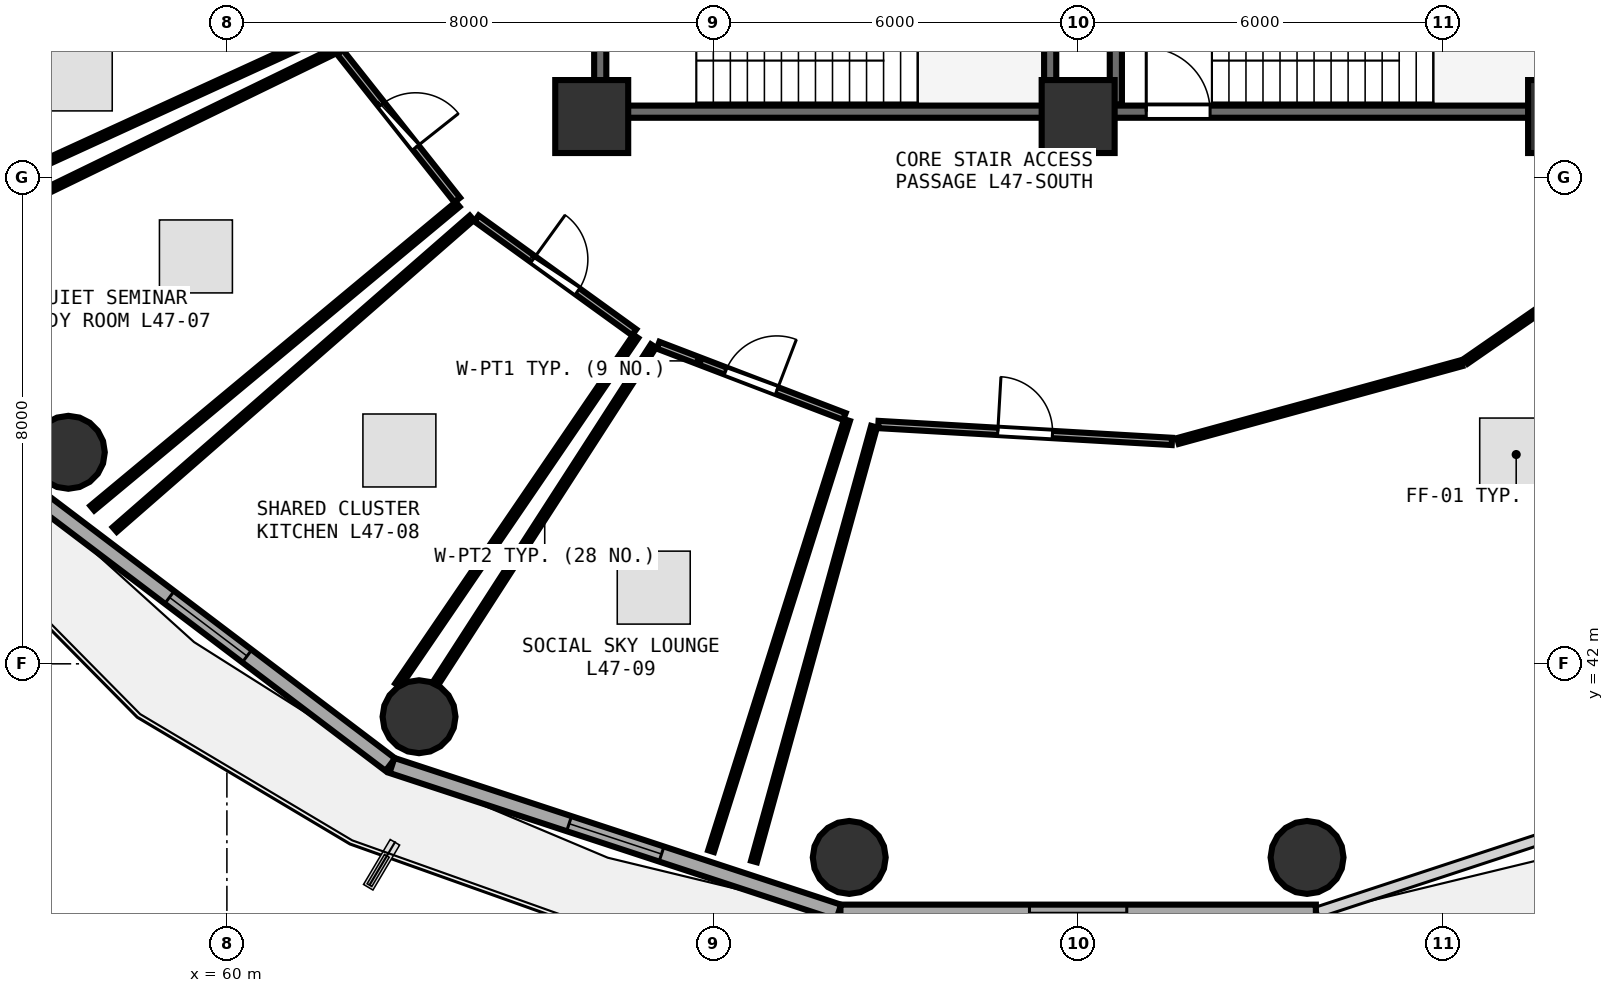
"""IFC4 building model, lengths in metres.
Left out: names, types, materials, properties, quantities, classifications, styles, units other than length and angle.
Written with IfcOpenShell. Run it as: python <this file> out.ifc"""

import sys

from ifc_helpers import new_model, si_unit, direction, frame, frame_2d, origin, origin_2d, place, context, subcontext, project, spatial, rectangle, circle, extrude, element, fill, save


model = new_model("IFC4")
c1 = context("Model", 3, precision=1e-05, world=origin(), true_north=direction((0.0, 1.0)))
c2 = subcontext(c1, "Body", "Model", "MODEL_VIEW")
j1 = project(units=[si_unit("LENGTHUNIT", "METRE"), si_unit("PLANEANGLEUNIT", "RADIAN")], contexts=[c1])
p1 = place(None, origin())
s1 = spatial("IfcSite", under=j1, at=p1, CompositionType="ELEMENT")
p2 = place(p1, origin())
s2 = spatial("IfcBuilding", under=s1, at=p2, CompositionType="ELEMENT")
p3 = place(p2, frame((0.0, 0.0, 184.35)))
s3 = spatial("IfcBuildingStorey", under=s2, at=p3, CompositionType="ELEMENT", Elevation=184.35)
for number, where, z_axis, x_axis in (
    (1, (66.0, 51.0, 0.0), (0.0, 0.0, 1.0), (1.0, 0.0, 0.0)),
    (2, (74.0, 51.0, 0.0), (0.0, 0.0, 1.0), (1.0, 0.0, 0.0)),
    (3, (82.0, 51.0, 0.0), (0.0, 0.0, 1.0), (1.0, 0.0, 0.0)),
):
    element("IfcColumn", number, at=place(p3, frame(where, z_axis=z_axis, x_axis=x_axis)), inside=s3, PredefinedType="PILASTER", context=c2, shape_type="SweptSolid", body=[
        extrude(rectangle(XDim=1.2, YDim=1.2, at=origin_2d()), origin(), (0.0, 0.0, 1.0), 4.76),
    ])
for number, where, z_axis, x_axis in (
    (4, (57.392, 45.479, 0.0), (0.0, 0.0, 1.0), (1.0, 0.0, 0.0)),
    (5, (63.16, 41.13, 0.0), (0.0, 0.0, 1.0), (1.0, 0.0, 0.0)),
    (6, (70.235, 38.816, 0.0), (0.0, 0.0, 1.0), (1.0, 0.0, 0.0)),
    (7, (77.765, 38.816, 0.0), (0.0, 0.0, 1.0), (1.0, 0.0, 0.0)),
):
    element("IfcColumn", number, at=place(p3, frame(where, z_axis=z_axis, x_axis=x_axis)), inside=s3, PredefinedType="COLUMN", context=c2, shape_type="SweptSolid", body=[
        extrude(circle(Radius=0.6, at=origin_2d()), origin(), (0.0, 0.0, 1.0), 4.76),
    ])
p4 = place(p3, frame((56.699, 44.878, 0.0), z_axis=(0.0, 0.0, 1.0), x_axis=(0.797163719609, -0.603763202042, 0.0)))
e8 = element("IfcWall", 8, at=p4, inside=s3, PredefinedType="SOLIDWALL", context=c2, shape_type="SweptSolid", body=[
    extrude(rectangle(XDim=7.512, YDim=0.26, at=frame_2d((3.756, 0.0))), origin(), (0.0, 0.0, 1.0), 4.345),
])
p5 = place(p4, frame((2.956, 0.0, 0.85)))
e9 = element("IfcOpeningElement", 9, at=p5, cuts=e8, PredefinedType="OPENING", context=c2, shape_type="SweptSolid", body=[
    extrude(rectangle(XDim=1.6, YDim=1.45, at=frame_2d((0.8, 0.725))), frame((0.0, 0.14, 0.0), z_axis=(0.0, -1.0, 0.0), x_axis=(1.0, 0.0, 0.0)), (0.0, 0.0, 1.0), 0.28),
])
p6 = place(p3, frame((62.714, 40.328, 0.0), z_axis=(0.0, 0.0, 1.0), x_axis=(0.950038302428, -0.312133343173, 0.0)))
e10 = element("IfcWall", 10, at=p6, inside=s3, PredefinedType="SOLIDWALL", context=c2, shape_type="SweptSolid", body=[
    extrude(rectangle(XDim=7.733, YDim=0.26, at=frame_2d((3.867, 0.0))), origin(), (0.0, 0.0, 1.0), 4.345),
])
p7 = place(p6, frame((3.067, 0.0, 0.85)))
e11 = element("IfcOpeningElement", 11, at=p7, cuts=e10, PredefinedType="OPENING", context=c2, shape_type="SweptSolid", body=[
    extrude(rectangle(XDim=1.6, YDim=1.45, at=frame_2d((0.8, 0.725))), frame((0.0, 0.14, 0.0), z_axis=(0.0, -1.0, 0.0), x_axis=(1.0, 0.0, 0.0)), (0.0, 0.0, 1.0), 0.28),
])
p8 = place(p3, frame((70.091, 37.91, 0.0), z_axis=(0.0, 0.0, 1.0), x_axis=(1.0, 0.0, 0.0)))
e12 = element("IfcWall", 12, at=p8, inside=s3, PredefinedType="SOLIDWALL", context=c2, shape_type="SweptSolid", body=[
    extrude(rectangle(XDim=7.819, YDim=0.26, at=frame_2d((3.909, 0.0))), origin(), (0.0, 0.0, 1.0), 4.345),
])
p9 = place(p8, frame((3.109, 0.0, 0.85)))
e13 = element("IfcOpeningElement", 13, at=p9, cuts=e12, PredefinedType="OPENING", context=c2, shape_type="SweptSolid", body=[
    extrude(rectangle(XDim=1.6, YDim=1.45, at=frame_2d((0.8, 0.725))), frame((0.0, 0.14, 0.0), z_axis=(0.0, -1.0, 0.0), x_axis=(1.0, 0.0, 0.0)), (0.0, 0.0, 1.0), 0.28),
])
p10 = place(p3, frame((74.0, 51.08, 0.0), z_axis=(0.0, 0.0, 1.0), x_axis=(1.0, 0.0, 0.0)))
e14 = element("IfcWall", 14, at=p10, inside=s3, PredefinedType="SHEAR", context=c2, shape_type="SweptSolid", body=[
    extrude(rectangle(XDim=7.9, YDim=0.2, at=frame_2d((3.95, 0.0))), origin(), (0.0, 0.0, 1.0), 4.36),
])
p11 = place(p10, frame((1.12, 0.0, 0.0)))
e15 = element("IfcOpeningElement", 15, at=p11, cuts=e14, PredefinedType="OPENING", context=c2, shape_type="SweptSolid", body=[
    extrude(rectangle(XDim=1.05, YDim=2.1, at=frame_2d((0.525, 1.05))), frame((0.0, 0.11, 0.0), z_axis=(0.0, -1.0, 0.0), x_axis=(1.0, 0.0, 0.0)), (0.0, 0.0, 1.0), 0.22),
])
p12 = place(p3, frame((74.62, 54.27, 0.0), z_axis=(0.0, 0.0, 1.0), x_axis=(0.0, -1.0, 0.0)))
e16 = element("IfcWall", 16, at=p12, inside=s3, PredefinedType="SHEAR", context=c2, shape_type="SweptSolid", body=[
    extrude(rectangle(XDim=3.07, YDim=0.2, at=frame_2d((1.535, 0.0))), origin(), (0.0, 0.0, 1.0), 4.36),
])
p13 = place(p3, frame((66.26, 51.08, 0.0), z_axis=(0.0, 0.0, 1.0), x_axis=(1.0, 0.0, 0.0)))
e17 = element("IfcWall", 17, at=p13, inside=s3, PredefinedType="SHEAR", context=c2, shape_type="SweptSolid", body=[
    extrude(rectangle(XDim=7.16, YDim=0.2, at=frame_2d((3.58, 0.0))), origin(), (0.0, 0.0, 1.0), 4.36),
])
p14 = place(p3, frame((73.54, 51.2, 0.0), z_axis=(0.0, 0.0, 1.0), x_axis=(0.0, 1.0, 0.0)))
e18 = element("IfcWall", 18, at=p14, inside=s3, PredefinedType="SHEAR", context=c2, shape_type="SweptSolid", body=[
    extrude(rectangle(XDim=3.07, YDim=0.2, at=frame_2d((1.535, 0.0))), origin(), (0.0, 0.0, 1.0), 4.36),
])
p15 = place(p3, frame((66.14, 54.27, 0.0), z_axis=(0.0, 0.0, 1.0), x_axis=(0.0, -1.0, 0.0)))
e19 = element("IfcWall", 19, at=p15, inside=s3, PredefinedType="SHEAR", context=c2, shape_type="SweptSolid", body=[
    extrude(rectangle(XDim=3.07, YDim=0.2, at=frame_2d((1.535, 0.0))), origin(), (0.0, 0.0, 1.0), 4.36),
])
p16 = place(p15, frame((1.01, 0.0, 0.0)))
e20 = element("IfcOpeningElement", 20, at=p16, cuts=e19, PredefinedType="OPENING", context=c2, shape_type="SweptSolid", body=[
    extrude(rectangle(XDim=1.05, YDim=2.1, at=frame_2d((0.525, 1.05))), frame((0.0, 0.11, 0.0), z_axis=(0.0, -1.0, 0.0), x_axis=(1.0, 0.0, 0.0)), (0.0, 0.0, 1.0), 0.22),
])
p17 = place(p3, frame((70.714, 45.936, 0.0), z_axis=(0.0, 0.0, 1.0), x_axis=(0.998345519296, -0.057499774802, 0.0)))
e21 = element("IfcWall", 21, at=p17, inside=s3, PredefinedType="PARTITIONING", context=c2, shape_type="SweptSolid", body=[
    extrude(rectangle(XDim=4.836, YDim=0.12, at=frame_2d((2.418, 0.0))), origin(), (0.0, 0.0, 1.0), 2.345),
])
p18 = place(p17, frame((1.968, 0.0, 0.0)))
e22 = element("IfcOpeningElement", 22, at=p18, cuts=e21, PredefinedType="OPENING", context=c2, shape_type="SweptSolid", body=[
    extrude(rectangle(XDim=0.9, YDim=2.08, at=frame_2d((0.45, 1.04))), frame((0.0, 0.07, 0.0), z_axis=(0.0, -1.0, 0.0), x_axis=(1.0, 0.0, 0.0)), (0.0, 0.0, 1.0), 0.14),
])
p19 = place(p3, frame((61.86, 52.06, 0.0), z_axis=(0.0, 0.0, 1.0), x_axis=(0.621061577605, -0.783761773005, 0.0)))
e23 = element("IfcWall", 23, at=p19, inside=s3, PredefinedType="PARTITIONING", context=c2, shape_type="SweptSolid", body=[
    extrude(rectangle(XDim=3.103, YDim=0.12, at=frame_2d((1.552, 0.0))), origin(), (0.0, 0.0, 1.0), 2.345),
])
p20 = place(p19, frame((1.102, 0.0, 0.0)))
e24 = element("IfcOpeningElement", 24, at=p20, cuts=e23, PredefinedType="OPENING", context=c2, shape_type="SweptSolid", body=[
    extrude(rectangle(XDim=0.9, YDim=2.08, at=frame_2d((0.45, 1.04))), frame((0.0, 0.07, 0.0), z_axis=(0.0, -1.0, 0.0), x_axis=(1.0, 0.0, 0.0)), (0.0, 0.0, 1.0), 0.14),
])
p21 = place(p3, frame((64.106, 49.325, 0.0), z_axis=(0.0, 0.0, 1.0), x_axis=(0.810538273734, -0.585685672364, 0.0)))
e25 = element("IfcWall", 25, at=p21, inside=s3, PredefinedType="PARTITIONING", context=c2, shape_type="SweptSolid", body=[
    extrude(rectangle(XDim=3.198, YDim=0.12, at=frame_2d((1.599, 0.0))), origin(), (0.0, 0.0, 1.0), 2.345),
])
p22 = place(p21, frame((1.149, 0.0, 0.0)))
e26 = element("IfcOpeningElement", 26, at=p22, cuts=e25, PredefinedType="OPENING", context=c2, shape_type="SweptSolid", body=[
    extrude(rectangle(XDim=0.9, YDim=2.08, at=frame_2d((0.45, 1.04))), frame((0.0, 0.07, 0.0), z_axis=(0.0, -1.0, 0.0), x_axis=(1.0, 0.0, 0.0)), (0.0, 0.0, 1.0), 0.14),
])
p23 = place(p3, frame((67.092, 47.24, 0.0), z_axis=(0.0, 0.0, 1.0), x_axis=(0.93395246748, -0.35739724186, 0.0)))
e27 = element("IfcWall", 27, at=p23, inside=s3, PredefinedType="PARTITIONING", context=c2, shape_type="SweptSolid", body=[
    extrude(rectangle(XDim=3.28, YDim=0.12, at=frame_2d((1.64, 0.0))), origin(), (0.0, 0.0, 1.0), 4.105),
])
p24 = place(p23, frame((1.19, 0.0, 0.0)))
e28 = element("IfcOpeningElement", 28, at=p24, cuts=e27, PredefinedType="OPENING", context=c2, shape_type="SweptSolid", body=[
    extrude(rectangle(XDim=0.9, YDim=2.08, at=frame_2d((0.45, 1.04))), frame((0.0, 0.07, 0.0), z_axis=(0.0, -1.0, 0.0), x_axis=(1.0, 0.0, 0.0)), (0.0, 0.0, 1.0), 0.14),
])
p25 = place(p3, frame((75.641, 45.665, 0.0), z_axis=(0.0, 0.0, 1.0), x_axis=(0.964402925862, 0.264437131637, 0.0)))
e29 = element("IfcWall", 29, at=p25, inside=s3, PredefinedType="PARTITIONING", context=c2, shape_type="SweptSolid", body=[
    extrude(rectangle(XDim=4.836, YDim=0.1, at=frame_2d((2.418, 0.0))), origin(), (0.0, 0.0, 1.0), 2.345),
])
p26 = place(p3, frame((80.376, 46.977, 0.0), z_axis=(0.0, 0.0, 1.0), x_axis=(0.821969471946, 0.569531550653, 0.0)))
e30 = element("IfcWall", 30, at=p26, inside=s3, PredefinedType="PARTITIONING", context=c2, shape_type="SweptSolid", body=[
    extrude(rectangle(XDim=4.697, YDim=0.1, at=frame_2d((2.349, 0.0))), origin(), (0.0, 0.0, 1.0), 2.345),
])
p27 = place(p3, frame((68.669, 38.75, 0.0), z_axis=(0.0, 0.0, 1.0), x_axis=(0.26617364863, 0.963925095002, 0.0)))
e31 = element("IfcWall", 31, at=p27, inside=s3, PredefinedType="PARTITIONING", context=c2, shape_type="SweptSolid", body=[
    extrude(rectangle(XDim=7.418, YDim=0.1, at=frame_2d((3.709, 0.0))), origin(), (0.0, 0.0, 1.0), 3.895),
])
p28 = place(p3, frame((61.63, 52.359, 0.0), z_axis=(0.0, 0.0, 1.0), x_axis=(-0.909155211227, -0.416457443083, 0.0)))
e32 = element("IfcWall", 32, at=p28, inside=s3, PredefinedType="PARTITIONING", context=c2, shape_type="SweptSolid", body=[
    extrude(rectangle(XDim=8.012, YDim=0.1, at=frame_2d((4.006, 0.0))), origin(), (0.0, 0.0, 1.0), 2.345),
])
p29 = place(p3, frame((54.083, 51.765, 0.0), z_axis=(0.0, 0.0, 1.0), x_axis=(0.954047805858, 0.299654441212, 0.0)))
e33 = element("IfcWall", 33, at=p29, inside=s3, PredefinedType="PARTITIONING", context=c2, shape_type="SweptSolid", body=[
    extrude(rectangle(XDim=3.798, YDim=0.1, at=frame_2d((1.899, 0.0))), origin(), (0.0, 0.0, 1.0), 2.345),
])
p30 = place(p3, frame((63.794, 49.555, 0.0), z_axis=(0.0, 0.0, 1.0), x_axis=(-0.768927769446, -0.639335659396, 0.0)))
e34 = element("IfcWall", 34, at=p30, inside=s3, PredefinedType="PARTITIONING", context=c2, shape_type="SweptSolid", body=[
    extrude(rectangle(XDim=7.812, YDim=0.1, at=frame_2d((3.906, 0.0))), origin(), (0.0, 0.0, 1.0), 2.345),
])
p31 = place(p3, frame((54.595, 48.593, 0.0), z_axis=(0.0, 0.0, 1.0), x_axis=(0.899324003441, 0.437282902518, 0.0)))
e35 = element("IfcWall", 35, at=p31, inside=s3, PredefinedType="PARTITIONING", context=c2, shape_type="SweptSolid", body=[
    extrude(rectangle(XDim=7.997, YDim=0.1, at=frame_2d((3.999, 0.0))), origin(), (0.0, 0.0, 1.0), 2.345),
])
p32 = place(p3, frame((66.723, 47.384, 0.0), z_axis=(0.0, 0.0, 1.0), x_axis=(-0.563521193737, -0.826101606468, 0.0)))
e36 = element("IfcWall", 36, at=p32, inside=s3, PredefinedType="PARTITIONING", context=c2, shape_type="SweptSolid", body=[
    extrude(rectangle(XDim=6.944, YDim=0.1, at=frame_2d((3.472, 0.0))), origin(), (0.0, 0.0, 1.0), 2.345),
])
p33 = place(p3, frame((58.156, 44.208, 0.0), z_axis=(0.0, 0.0, 1.0), x_axis=(0.753307828271, 0.657668089438, 0.0)))
e37 = element("IfcWall", 37, at=p33, inside=s3, PredefinedType="PARTITIONING", context=c2, shape_type="SweptSolid", body=[
    extrude(rectangle(XDim=7.793, YDim=0.1, at=frame_2d((3.897, 0.0))), origin(), (0.0, 0.0, 1.0), 2.345),
])
p34 = place(p3, frame((70.199, 46.008, 0.0), z_axis=(0.0, 0.0, 1.0), x_axis=(-0.300834252316, -0.953676440222, 0.0)))
e38 = element("IfcWall", 38, at=p34, inside=s3, PredefinedType="PARTITIONING", context=c2, shape_type="SweptSolid", body=[
    extrude(rectangle(XDim=7.433, YDim=0.1, at=frame_2d((3.716, 0.0))), origin(), (0.0, 0.0, 1.0), 3.895),
])
p35 = place(p3, frame((63.44, 41.689, 0.0), z_axis=(0.0, 0.0, 1.0), x_axis=(0.542254246964, 0.840214455749, 0.0)))
e39 = element("IfcWall", 39, at=p35, inside=s3, PredefinedType="PARTITIONING", context=c2, shape_type="SweptSolid", body=[
    extrude(rectangle(XDim=6.592, YDim=0.1, at=frame_2d((3.296, 0.0))), origin(), (0.0, 0.0, 1.0), 2.345),
])
p36 = place(p5, origin())
e40 = element("IfcWindow", 40, at=p36, inside=s3, PartitioningType="SINGLE_PANEL", PredefinedType="WINDOW", context=c2, shape_type="SweptSolid", body=[
    extrude(rectangle(XDim=1.6, YDim=1.45, at=frame_2d((0.8, 0.725))), frame((0.0, 0.03, 0.0), z_axis=(0.0, -1.0, 0.0), x_axis=(1.0, 0.0, 0.0)), (0.0, 0.0, 1.0), 0.06),
])
fill(e9, e40)
p37 = place(p7, origin())
e41 = element("IfcWindow", 41, at=p37, inside=s3, PartitioningType="SINGLE_PANEL", PredefinedType="WINDOW", context=c2, shape_type="SweptSolid", body=[
    extrude(rectangle(XDim=1.6, YDim=1.45, at=frame_2d((0.8, 0.725))), frame((0.0, 0.03, 0.0), z_axis=(0.0, -1.0, 0.0), x_axis=(1.0, 0.0, 0.0)), (0.0, 0.0, 1.0), 0.06),
])
fill(e11, e41)
p38 = place(p9, origin())
e42 = element("IfcWindow", 42, at=p38, inside=s3, PartitioningType="SINGLE_PANEL", PredefinedType="WINDOW", context=c2, shape_type="SweptSolid", body=[
    extrude(rectangle(XDim=1.6, YDim=1.45, at=frame_2d((0.8, 0.725))), frame((0.0, 0.03, 0.0), z_axis=(0.0, -1.0, 0.0), x_axis=(1.0, 0.0, 0.0)), (0.0, 0.0, 1.0), 0.06),
])
fill(e13, e42)
p39 = place(p11, origin())
e43 = element("IfcDoor", 43, at=p39, inside=s3, OperationType="SINGLE_SWING_LEFT", PredefinedType="DOOR", context=c2, shape_type="SweptSolid", body=[
    extrude(rectangle(XDim=1.05, YDim=2.1, at=frame_2d((0.525, 1.05))), frame((0.0, 0.025, 0.0), z_axis=(0.0, -1.0, 0.0), x_axis=(1.0, 0.0, 0.0)), (0.0, 0.0, 1.0), 0.05),
])
fill(e15, e43)
p40 = place(p18, origin())
e44 = element("IfcDoor", 44, at=p40, inside=s3, OperationType="SINGLE_SWING_LEFT", PredefinedType="DOOR", context=c2, shape_type="SweptSolid", body=[
    extrude(rectangle(XDim=0.9, YDim=2.08, at=frame_2d((0.45, 1.04))), frame((0.0, 0.025, 0.0), z_axis=(0.0, -1.0, 0.0), x_axis=(1.0, 0.0, 0.0)), (0.0, 0.0, 1.0), 0.05),
])
fill(e22, e44)
p41 = place(p20, origin())
e45 = element("IfcDoor", 45, at=p41, inside=s3, OperationType="SINGLE_SWING_RIGHT", PredefinedType="DOOR", context=c2, shape_type="SweptSolid", body=[
    extrude(rectangle(XDim=0.9, YDim=2.08, at=frame_2d((0.45, 1.04))), frame((0.0, 0.025, 0.0), z_axis=(0.0, -1.0, 0.0), x_axis=(1.0, 0.0, 0.0)), (0.0, 0.0, 1.0), 0.05),
])
fill(e24, e45)
p42 = place(p22, origin())
e46 = element("IfcDoor", 46, at=p42, inside=s3, OperationType="SINGLE_SWING_LEFT", PredefinedType="DOOR", context=c2, shape_type="SweptSolid", body=[
    extrude(rectangle(XDim=0.9, YDim=2.08, at=frame_2d((0.45, 1.04))), frame((0.0, 0.025, 0.0), z_axis=(0.0, -1.0, 0.0), x_axis=(1.0, 0.0, 0.0)), (0.0, 0.0, 1.0), 0.05),
])
fill(e26, e46)
p43 = place(p24, origin())
e47 = element("IfcDoor", 47, at=p43, inside=s3, OperationType="SINGLE_SWING_RIGHT", PredefinedType="DOOR", context=c2, shape_type="SweptSolid", body=[
    extrude(rectangle(XDim=0.9, YDim=2.08, at=frame_2d((0.45, 1.04))), frame((0.0, 0.025, 0.0), z_axis=(0.0, -1.0, 0.0), x_axis=(1.0, 0.0, 0.0)), (0.0, 0.0, 1.0), 0.05),
])
fill(e28, e47)
save(model, sys.argv[1])
